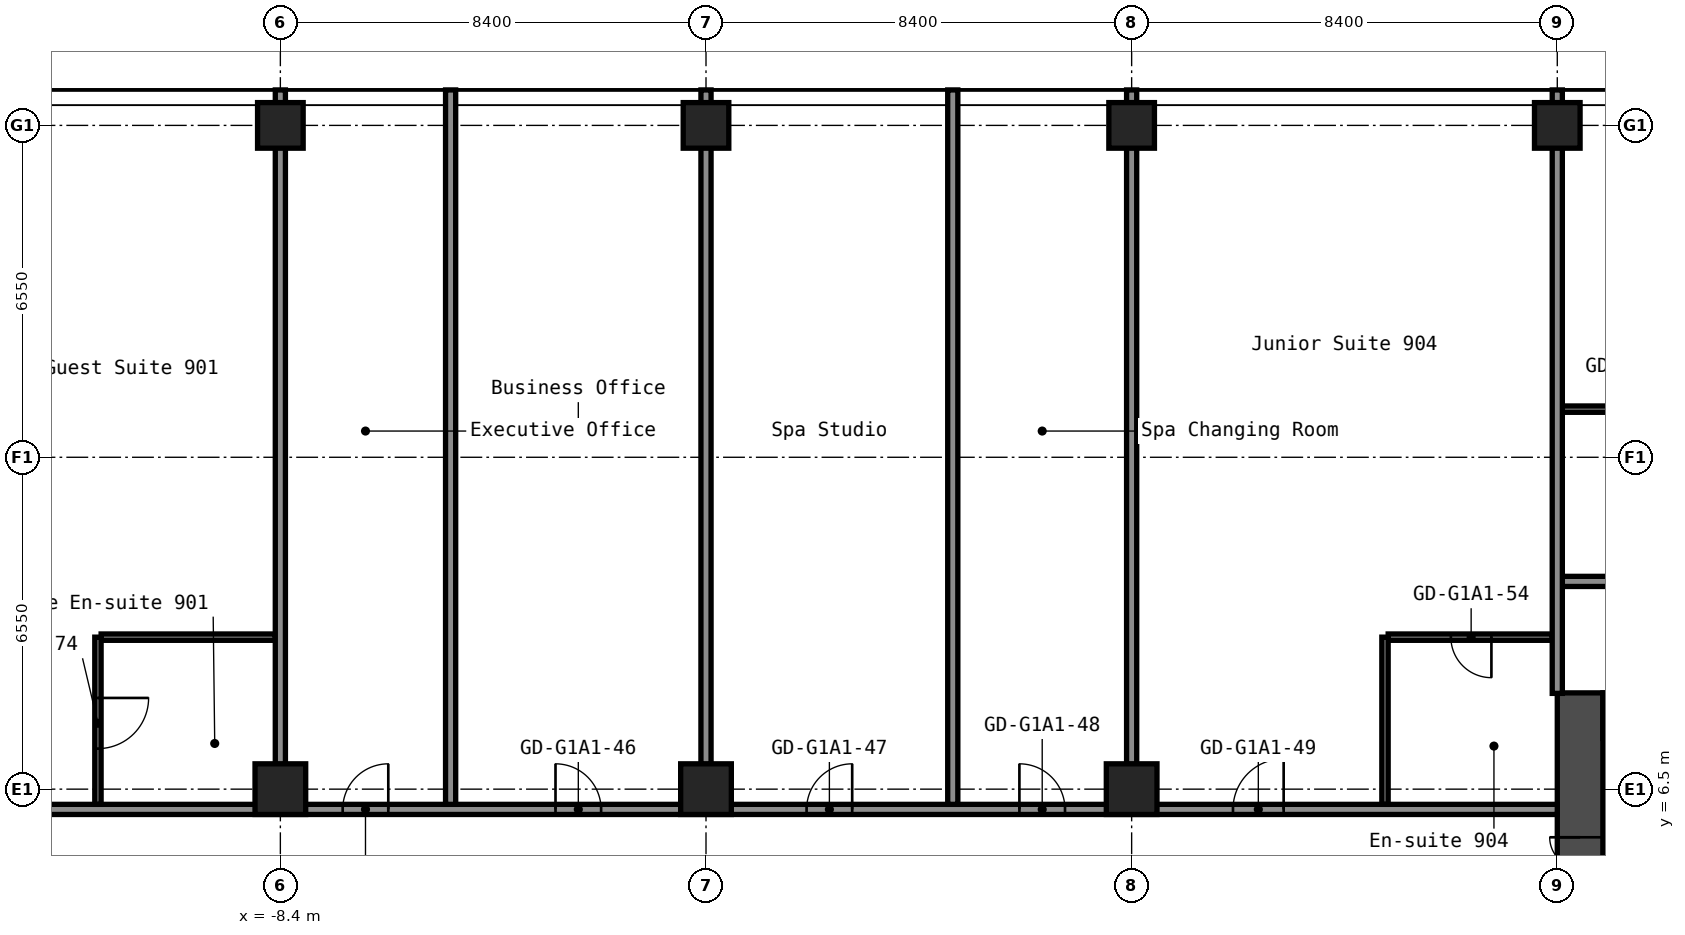
"""IFC4 building model, lengths in metres.
Left out: names, types, materials, properties, quantities, classifications, styles, units other than length and angle.
Written with IfcOpenShell. Run it as: python <this file> out.ifc"""

import sys

from ifc_helpers import new_model, si_unit, direction, frame, frame_2d, origin, origin_2d, place, context, subcontext, project, spatial, rectangle, hollow_rectangle, extrude, element, fill, save


model = new_model("IFC4")
c1 = context("Model", 3, precision=1e-05, world=origin(), true_north=direction((0.0, 1.0)))
c2 = subcontext(c1, "Body", "Model", "MODEL_VIEW")
j1 = project(units=[si_unit("LENGTHUNIT", "METRE"), si_unit("PLANEANGLEUNIT", "RADIAN")], contexts=[c1])
p1 = place(None, origin())
s1 = spatial("IfcSite", under=j1, at=p1, CompositionType="ELEMENT")
p2 = place(p1, origin())
s2 = spatial("IfcBuilding", under=s1, at=p2, CompositionType="ELEMENT")
p3 = place(p2, frame((0.0, 0.0, 35.8)))
s3 = spatial("IfcBuildingStorey", under=s2, at=p3, CompositionType="ELEMENT", Elevation=35.8)
p4 = place(p3, frame((-8.4, 6.5, 0.0), z_axis=(0.0, 0.0, 1.0), x_axis=(1.0, 0.0, 0.0)))
e1 = element("IfcColumn", 1, at=p4, inside=s3, PredefinedType="COLUMN", context=c2, shape_type="SweptSolid", body=[
    extrude(hollow_rectangle(XDim=1.0, YDim=1.0, WallThickness=0.04, at=origin_2d()), origin(), (0.0, 0.0, 1.0), 2.8),
])
p5 = place(p3, frame((-8.4, 19.6, 0.0), z_axis=(0.0, 0.0, 1.0), x_axis=(1.0, 0.0, 0.0)))
e2 = element("IfcColumn", 2, at=p5, inside=s3, PredefinedType="COLUMN", context=c2, shape_type="SweptSolid", body=[
    extrude(hollow_rectangle(XDim=0.9, YDim=0.9, WallThickness=0.036, at=origin_2d()), origin(), (0.0, 0.0, 1.0), 2.8),
])
p6 = place(p3, frame((0.0, 6.5, 0.0), z_axis=(0.0, 0.0, 1.0), x_axis=(1.0, 0.0, 0.0)))
e3 = element("IfcColumn", 3, at=p6, inside=s3, PredefinedType="COLUMN", context=c2, shape_type="SweptSolid", body=[
    extrude(hollow_rectangle(XDim=1.0, YDim=1.0, WallThickness=0.04, at=origin_2d()), origin(), (0.0, 0.0, 1.0), 2.8),
])
p7 = place(p3, frame((0.0, 19.6, 0.0), z_axis=(0.0, 0.0, 1.0), x_axis=(1.0, 0.0, 0.0)))
e4 = element("IfcColumn", 4, at=p7, inside=s3, PredefinedType="COLUMN", context=c2, shape_type="SweptSolid", body=[
    extrude(hollow_rectangle(XDim=0.9, YDim=0.9, WallThickness=0.036, at=origin_2d()), origin(), (0.0, 0.0, 1.0), 2.8),
])
p8 = place(p3, frame((8.4, 6.5, 0.0), z_axis=(0.0, 0.0, 1.0), x_axis=(1.0, 0.0, 0.0)))
e5 = element("IfcColumn", 5, at=p8, inside=s3, PredefinedType="COLUMN", context=c2, shape_type="SweptSolid", body=[
    extrude(hollow_rectangle(XDim=1.0, YDim=1.0, WallThickness=0.04, at=origin_2d()), origin(), (0.0, 0.0, 1.0), 2.8),
])
for number, where, z_axis, x_axis in (
    (6, (8.4, 19.6, 0.0), (0.0, 0.0, 1.0), (1.0, 0.0, 0.0)),
    (7, (16.8, 19.6, 0.0), (0.0, 0.0, 1.0), (1.0, 0.0, 0.0)),
):
    element("IfcColumn", number, at=place(p3, frame(where, z_axis=z_axis, x_axis=x_axis)), inside=s3, PredefinedType="COLUMN", context=c2, shape_type="SweptSolid", body=[
        extrude(hollow_rectangle(XDim=0.9, YDim=0.9, WallThickness=0.036, at=origin_2d()), origin(), (0.0, 0.0, 1.0), 2.8),
    ])
p9 = place(p3, frame((17.25, -8.4, 0.0), z_axis=(0.0, 0.0, 1.0), x_axis=(0.0, 1.0, 0.0)))
e8 = element("IfcWall", 8, at=p9, inside=s3, PredefinedType="SHEAR", context=c2, shape_type="SweptSolid", body=[
    extrude(rectangle(XDim=16.8, YDim=0.9, at=frame_2d((8.4, 0.0))), origin(), (0.0, 0.0, 1.0), 2.8),
])
p10 = place(p9, frame((12.75, 0.0, 0.0)))
e9 = element("IfcOpeningElement", 9, at=p10, cuts=e8, PredefinedType="OPENING", context=c2, shape_type="SweptSolid", body=[
    extrude(rectangle(XDim=1.2, YDim=2.1, at=frame_2d((0.6, 1.05))), frame((0.0, 0.46, 0.0), z_axis=(0.0, -1.0, 0.0), x_axis=(1.0, 0.0, 0.0)), (0.0, 0.0, 1.0), 0.92),
])
p11 = place(p9, frame((2.85, 0.0, 0.0)))
e10 = element("IfcOpeningElement", 10, at=p11, cuts=e8, PredefinedType="OPENING", context=c2, shape_type="SweptSolid", body=[
    extrude(rectangle(XDim=1.2, YDim=2.1, at=frame_2d((0.6, 1.05))), frame((0.0, 0.46, 0.0), z_axis=(0.0, -1.0, 0.0), x_axis=(1.0, 0.0, 0.0)), (0.0, 0.0, 1.0), 0.92),
])
p12 = place(p3, frame((17.7, 7.95, 0.0), z_axis=(0.0, 0.0, 1.0), x_axis=(1.0, 0.0, 0.0)))
e11 = element("IfcWall", 11, at=p12, inside=s3, PredefinedType="SHEAR", context=c2, shape_type="SweptSolid", body=[
    extrude(rectangle(XDim=15.0, YDim=0.9, at=frame_2d((7.5, 0.0))), origin(), (0.0, 0.0, 1.0), 2.8),
])
p13 = place(p12, frame((10.4, 0.0, 0.0)))
e12 = element("IfcOpeningElement", 12, at=p13, cuts=e11, PredefinedType="OPENING", context=c2, shape_type="SweptSolid", body=[
    extrude(rectangle(XDim=1.2, YDim=2.1, at=frame_2d((0.6, 1.05))), frame((0.0, 0.46, 0.0), z_axis=(0.0, -1.0, 0.0), x_axis=(1.0, 0.0, 0.0)), (0.0, 0.0, 1.0), 0.92),
])
p14 = place(p12, frame((13.35, 0.0, 0.0)))
e13 = element("IfcOpeningElement", 13, at=p14, cuts=e11, PredefinedType="OPENING", context=c2, shape_type="SweptSolid", body=[
    extrude(rectangle(XDim=0.9, YDim=2.1, at=frame_2d((0.45, 1.05))), frame((0.0, 0.46, 0.0), z_axis=(0.0, -1.0, 0.0), x_axis=(1.0, 0.0, 0.0)), (0.0, 0.0, 1.0), 0.92),
])
p15 = place(p3, frame((-16.8, 6.1, 0.0), z_axis=(0.0, 0.0, 1.0), x_axis=(1.0, 0.0, 0.0)))
e14 = element("IfcWall", 14, at=p15, inside=s3, PredefinedType="PARTITIONING", context=c2, shape_type="SweptSolid", body=[
    extrude(rectangle(XDim=33.6, YDim=0.2, at=frame_2d((16.8, 0.0))), origin(), (0.0, 0.0, 1.0), 2.8),
])
p16 = place(p15, frame((1.9, 0.0, 0.0)))
e15 = element("IfcOpeningElement", 15, at=p16, cuts=e14, PredefinedType="OPENING", context=c2, shape_type="SweptSolid", body=[
    extrude(rectangle(XDim=1.0, YDim=2.1, at=frame_2d((0.5, 1.05))), frame((0.0, 0.11, 0.0), z_axis=(0.0, -1.0, 0.0), x_axis=(1.0, 0.0, 0.0)), (0.0, 0.0, 1.0), 0.22),
])
p17 = place(p15, frame((9.63, 0.0, 0.0)))
e16 = element("IfcOpeningElement", 16, at=p17, cuts=e14, PredefinedType="OPENING", context=c2, shape_type="SweptSolid", body=[
    extrude(rectangle(XDim=0.9, YDim=2.1, at=frame_2d((0.45, 1.05))), frame((0.0, 0.11, 0.0), z_axis=(0.0, -1.0, 0.0), x_axis=(1.0, 0.0, 0.0)), (0.0, 0.0, 1.0), 0.22),
])
p18 = place(p15, frame((13.83, 0.0, 0.0)))
e17 = element("IfcOpeningElement", 17, at=p18, cuts=e14, PredefinedType="OPENING", context=c2, shape_type="SweptSolid", body=[
    extrude(rectangle(XDim=0.9, YDim=2.1, at=frame_2d((0.45, 1.05))), frame((0.0, 0.11, 0.0), z_axis=(0.0, -1.0, 0.0), x_axis=(1.0, 0.0, 0.0)), (0.0, 0.0, 1.0), 0.22),
])
p19 = place(p15, frame((18.785, 0.0, 0.0)))
e18 = element("IfcOpeningElement", 18, at=p19, cuts=e14, PredefinedType="OPENING", context=c2, shape_type="SweptSolid", body=[
    extrude(rectangle(XDim=0.9, YDim=2.1, at=frame_2d((0.45, 1.05))), frame((0.0, 0.11, 0.0), z_axis=(0.0, -1.0, 0.0), x_axis=(1.0, 0.0, 0.0)), (0.0, 0.0, 1.0), 0.22),
])
p20 = place(p15, frame((22.985, 0.0, 0.0)))
e19 = element("IfcOpeningElement", 19, at=p20, cuts=e14, PredefinedType="OPENING", context=c2, shape_type="SweptSolid", body=[
    extrude(rectangle(XDim=0.9, YDim=2.1, at=frame_2d((0.45, 1.05))), frame((0.0, 0.11, 0.0), z_axis=(0.0, -1.0, 0.0), x_axis=(1.0, 0.0, 0.0)), (0.0, 0.0, 1.0), 0.22),
])
p21 = place(p15, frame((27.2, 0.0, 0.0)))
e20 = element("IfcOpeningElement", 20, at=p21, cuts=e14, PredefinedType="OPENING", context=c2, shape_type="SweptSolid", body=[
    extrude(rectangle(XDim=1.0, YDim=2.1, at=frame_2d((0.5, 1.05))), frame((0.0, 0.11, 0.0), z_axis=(0.0, -1.0, 0.0), x_axis=(1.0, 0.0, 0.0)), (0.0, 0.0, 1.0), 0.22),
])
p22 = place(p3, frame((-11.938, 9.5, 0.0), z_axis=(0.0, 0.0, 1.0), x_axis=(1.0, 0.0, 0.0)))
e21 = element("IfcWall", 21, at=p22, inside=s3, PredefinedType="PARTITIONING", context=c2, shape_type="SweptSolid", body=[
    extrude(rectangle(XDim=3.438, YDim=0.125, at=frame_2d((1.719, 0.0))), origin(), (0.0, 0.0, 1.0), 2.8),
])
p23 = place(p3, frame((13.462, 9.5, 0.0), z_axis=(0.0, 0.0, 1.0), x_axis=(1.0, 0.0, 0.0)))
e22 = element("IfcWall", 22, at=p23, inside=s3, PredefinedType="PARTITIONING", context=c2, shape_type="SweptSolid", body=[
    extrude(rectangle(XDim=3.238, YDim=0.125, at=frame_2d((1.619, 0.0))), origin(), (0.0, 0.0, 1.0), 2.8),
])
p24 = place(p23, frame((1.238, 0.0, 0.0)))
e23 = element("IfcOpeningElement", 23, at=p24, cuts=e22, PredefinedType="OPENING", context=c2, shape_type="SweptSolid", body=[
    extrude(rectangle(XDim=0.8, YDim=2.1, at=frame_2d((0.4, 1.05))), frame((0.0, 0.073, 0.0), z_axis=(0.0, -1.0, 0.0), x_axis=(1.0, 0.0, 0.0)), (0.0, 0.0, 1.0), 0.145),
])
p25 = place(p3, frame((16.8, 10.6, 0.0), z_axis=(0.0, 0.0, 1.0), x_axis=(1.0, 0.0, 0.0)))
e24 = element("IfcWall", 24, at=p25, inside=s3, PredefinedType="PARTITIONING", context=c2, shape_type="SweptSolid", body=[
    extrude(rectangle(XDim=34.3, YDim=0.2, at=frame_2d((17.15, 0.0))), origin(), (0.0, 0.0, 1.0), 2.8),
])
p26 = place(p25, frame((5.4, 0.0, 0.0)))
e25 = element("IfcOpeningElement", 25, at=p26, cuts=e24, PredefinedType="OPENING", context=c2, shape_type="SweptSolid", body=[
    extrude(rectangle(XDim=1.0, YDim=2.1, at=frame_2d((0.5, 1.05))), frame((0.0, 0.11, 0.0), z_axis=(0.0, -1.0, 0.0), x_axis=(1.0, 0.0, 0.0)), (0.0, 0.0, 1.0), 0.22),
])
p27 = place(p25, frame((10.4, 0.0, 0.0)))
e26 = element("IfcOpeningElement", 26, at=p27, cuts=e24, PredefinedType="OPENING", context=c2, shape_type="SweptSolid", body=[
    extrude(rectangle(XDim=1.0, YDim=2.1, at=frame_2d((0.5, 1.05))), frame((0.0, 0.11, 0.0), z_axis=(0.0, -1.0, 0.0), x_axis=(1.0, 0.0, 0.0)), (0.0, 0.0, 1.0), 0.22),
])
p28 = place(p25, frame((22.2, 0.0, 0.0)))
e27 = element("IfcOpeningElement", 27, at=p28, cuts=e24, PredefinedType="OPENING", context=c2, shape_type="SweptSolid", body=[
    extrude(rectangle(XDim=1.0, YDim=2.1, at=frame_2d((0.5, 1.05))), frame((0.0, 0.11, 0.0), z_axis=(0.0, -1.0, 0.0), x_axis=(1.0, 0.0, 0.0)), (0.0, 0.0, 1.0), 0.22),
])
p29 = place(p25, frame((27.4, 0.0, 0.0)))
e28 = element("IfcOpeningElement", 28, at=p29, cuts=e24, PredefinedType="OPENING", context=c2, shape_type="SweptSolid", body=[
    extrude(rectangle(XDim=1.0, YDim=2.1, at=frame_2d((0.5, 1.05))), frame((0.0, 0.11, 0.0), z_axis=(0.0, -1.0, 0.0), x_axis=(1.0, 0.0, 0.0)), (0.0, 0.0, 1.0), 0.22),
])
p30 = place(p3, frame((16.9, 14.0, 0.0), z_axis=(0.0, 0.0, 1.0), x_axis=(1.0, 0.0, 0.0)))
e29 = element("IfcWall", 29, at=p30, inside=s3, PredefinedType="PARTITIONING", context=c2, shape_type="SweptSolid", body=[
    extrude(rectangle(XDim=3.238, YDim=0.125, at=frame_2d((1.619, 0.0))), origin(), (0.0, 0.0, 1.0), 2.8),
])
p31 = place(p30, frame((1.2, 0.0, 0.0)))
e30 = element("IfcOpeningElement", 30, at=p31, cuts=e29, PredefinedType="OPENING", context=c2, shape_type="SweptSolid", body=[
    extrude(rectangle(XDim=0.8, YDim=2.1, at=frame_2d((0.4, 1.05))), frame((0.0, 0.073, 0.0), z_axis=(0.0, -1.0, 0.0), x_axis=(1.0, 0.0, 0.0)), (0.0, 0.0, 1.0), 0.145),
])
p32 = place(p3, frame((-12.0, 6.2, 0.0), z_axis=(0.0, 0.0, 1.0), x_axis=(0.0, 1.0, 0.0)))
e31 = element("IfcWall", 31, at=p32, inside=s3, PredefinedType="PARTITIONING", context=c2, shape_type="SweptSolid", body=[
    extrude(rectangle(XDim=3.3, YDim=0.125, at=frame_2d((1.65, 0.0))), origin(), (0.0, 0.0, 1.0), 2.8),
])
p33 = place(p32, frame((1.1, 0.0, 0.0)))
e32 = element("IfcOpeningElement", 32, at=p33, cuts=e31, PredefinedType="OPENING", context=c2, shape_type="SweptSolid", body=[
    extrude(rectangle(XDim=1.0, YDim=2.1, at=frame_2d((0.5, 1.05))), frame((0.0, 0.073, 0.0), z_axis=(0.0, -1.0, 0.0), x_axis=(1.0, 0.0, 0.0)), (0.0, 0.0, 1.0), 0.145),
])
p34 = place(p3, frame((-8.4, 6.99, 0.0), z_axis=(0.0, 0.0, 1.0), x_axis=(0.0, 1.0, 0.0)))
e33 = element("IfcWall", 33, at=p34, inside=s3, PredefinedType="PARTITIONING", context=c2, shape_type="SweptSolid", body=[
    extrude(rectangle(XDim=13.31, YDim=0.2, at=frame_2d((6.655, 0.0))), origin(), (0.0, 0.0, 1.0), 2.8),
])
p35 = place(p3, frame((-5.04, 6.2, 0.0), z_axis=(0.0, 0.0, 1.0), x_axis=(0.0, 1.0, 0.0)))
e34 = element("IfcWall", 34, at=p35, inside=s3, PredefinedType="PARTITIONING", context=c2, shape_type="SweptSolid", body=[
    extrude(rectangle(XDim=14.1, YDim=0.2, at=frame_2d((7.05, 0.0))), origin(), (0.0, 0.0, 1.0), 2.8),
])
p36 = place(p3, frame((0.0, 6.99, 0.0), z_axis=(0.0, 0.0, 1.0), x_axis=(0.0, 1.0, 0.0)))
e35 = element("IfcWall", 35, at=p36, inside=s3, PredefinedType="PARTITIONING", context=c2, shape_type="SweptSolid", body=[
    extrude(rectangle(XDim=13.31, YDim=0.2, at=frame_2d((6.655, 0.0))), origin(), (0.0, 0.0, 1.0), 2.8),
])
p37 = place(p3, frame((4.87, 6.2, 0.0), z_axis=(0.0, 0.0, 1.0), x_axis=(0.0, 1.0, 0.0)))
e36 = element("IfcWall", 36, at=p37, inside=s3, PredefinedType="PARTITIONING", context=c2, shape_type="SweptSolid", body=[
    extrude(rectangle(XDim=14.1, YDim=0.2, at=frame_2d((7.05, 0.0))), origin(), (0.0, 0.0, 1.0), 2.8),
])
p38 = place(p3, frame((8.4, 6.99, 0.0), z_axis=(0.0, 0.0, 1.0), x_axis=(0.0, 1.0, 0.0)))
e37 = element("IfcWall", 37, at=p38, inside=s3, PredefinedType="PARTITIONING", context=c2, shape_type="SweptSolid", body=[
    extrude(rectangle(XDim=13.31, YDim=0.2, at=frame_2d((6.655, 0.0))), origin(), (0.0, 0.0, 1.0), 2.8),
])
p39 = place(p3, frame((13.4, 6.2, 0.0), z_axis=(0.0, 0.0, 1.0), x_axis=(0.0, 1.0, 0.0)))
e38 = element("IfcWall", 38, at=p39, inside=s3, PredefinedType="PARTITIONING", context=c2, shape_type="SweptSolid", body=[
    extrude(rectangle(XDim=3.3, YDim=0.125, at=frame_2d((1.65, 0.0))), origin(), (0.0, 0.0, 1.0), 2.8),
])
p40 = place(p3, frame((16.8, 8.39, 0.0), z_axis=(0.0, 0.0, 1.0), x_axis=(0.0, 1.0, 0.0)))
e39 = element("IfcWall", 39, at=p40, inside=s3, PredefinedType="PARTITIONING", context=c2, shape_type="SweptSolid", body=[
    extrude(rectangle(XDim=11.91, YDim=0.2, at=frame_2d((5.955, 0.0))), origin(), (0.0, 0.0, 1.0), 2.8),
])
p41 = place(p10, origin())
e40 = element("IfcDoor", 40, at=p41, inside=s3, OperationType="DOUBLE_DOOR_SINGLE_SWING", PredefinedType="DOOR", context=c2, shape_type="SweptSolid", body=[
    extrude(rectangle(XDim=1.2, YDim=2.1, at=frame_2d((0.6, 1.05))), frame((0.0, 0.025, 0.0), z_axis=(0.0, -1.0, 0.0), x_axis=(1.0, 0.0, 0.0)), (0.0, 0.0, 1.0), 0.05),
])
fill(e9, e40)
p42 = place(p17, origin())
e41 = element("IfcDoor", 41, at=p42, inside=s3, OperationType="SINGLE_SWING_LEFT", PredefinedType="DOOR", context=c2, shape_type="SweptSolid", body=[
    extrude(rectangle(XDim=0.9, YDim=2.1, at=frame_2d((0.45, 1.05))), frame((0.0, 0.025, 0.0), z_axis=(0.0, -1.0, 0.0), x_axis=(1.0, 0.0, 0.0)), (0.0, 0.0, 1.0), 0.05),
])
fill(e16, e41)
p43 = place(p18, origin())
e42 = element("IfcDoor", 42, at=p43, inside=s3, OperationType="SINGLE_SWING_RIGHT", PredefinedType="DOOR", context=c2, shape_type="SweptSolid", body=[
    extrude(rectangle(XDim=0.9, YDim=2.1, at=frame_2d((0.45, 1.05))), frame((0.0, 0.025, 0.0), z_axis=(0.0, -1.0, 0.0), x_axis=(1.0, 0.0, 0.0)), (0.0, 0.0, 1.0), 0.05),
])
fill(e17, e42)
p44 = place(p19, origin())
e43 = element("IfcDoor", 43, at=p44, inside=s3, OperationType="SINGLE_SWING_LEFT", PredefinedType="DOOR", context=c2, shape_type="SweptSolid", body=[
    extrude(rectangle(XDim=0.9, YDim=2.1, at=frame_2d((0.45, 1.05))), frame((0.0, 0.025, 0.0), z_axis=(0.0, -1.0, 0.0), x_axis=(1.0, 0.0, 0.0)), (0.0, 0.0, 1.0), 0.05),
])
fill(e18, e43)
p45 = place(p20, origin())
e44 = element("IfcDoor", 44, at=p45, inside=s3, OperationType="SINGLE_SWING_RIGHT", PredefinedType="DOOR", context=c2, shape_type="SweptSolid", body=[
    extrude(rectangle(XDim=0.9, YDim=2.1, at=frame_2d((0.45, 1.05))), frame((0.0, 0.025, 0.0), z_axis=(0.0, -1.0, 0.0), x_axis=(1.0, 0.0, 0.0)), (0.0, 0.0, 1.0), 0.05),
])
fill(e19, e44)
p46 = place(p21, origin())
e45 = element("IfcDoor", 45, at=p46, inside=s3, OperationType="SINGLE_SWING_LEFT", PredefinedType="DOOR", context=c2, shape_type="SweptSolid", body=[
    extrude(rectangle(XDim=1.0, YDim=2.1, at=frame_2d((0.5, 1.05))), frame((0.0, 0.025, 0.0), z_axis=(0.0, -1.0, 0.0), x_axis=(1.0, 0.0, 0.0)), (0.0, 0.0, 1.0), 0.05),
])
fill(e20, e45)
p47 = place(p24, origin())
e46 = element("IfcDoor", 46, at=p47, inside=s3, OperationType="SINGLE_SWING_RIGHT", PredefinedType="DOOR", context=c2, shape_type="SweptSolid", body=[
    extrude(rectangle(XDim=0.8, YDim=2.1, at=frame_2d((0.4, 1.05))), frame((0.0, 0.025, 0.0), z_axis=(0.0, -1.0, 0.0), x_axis=(1.0, 0.0, 0.0)), (0.0, 0.0, 1.0), 0.05),
])
fill(e23, e46)
p48 = place(p33, origin())
e47 = element("IfcDoor", 47, at=p48, inside=s3, OperationType="SINGLE_SWING_RIGHT", PredefinedType="DOOR", context=c2, shape_type="SweptSolid", body=[
    extrude(rectangle(XDim=1.0, YDim=2.1, at=frame_2d((0.5, 1.05))), frame((0.0, 0.025, 0.0), z_axis=(0.0, -1.0, 0.0), x_axis=(1.0, 0.0, 0.0)), (0.0, 0.0, 1.0), 0.05),
])
fill(e32, e47)
save(model, sys.argv[1])
